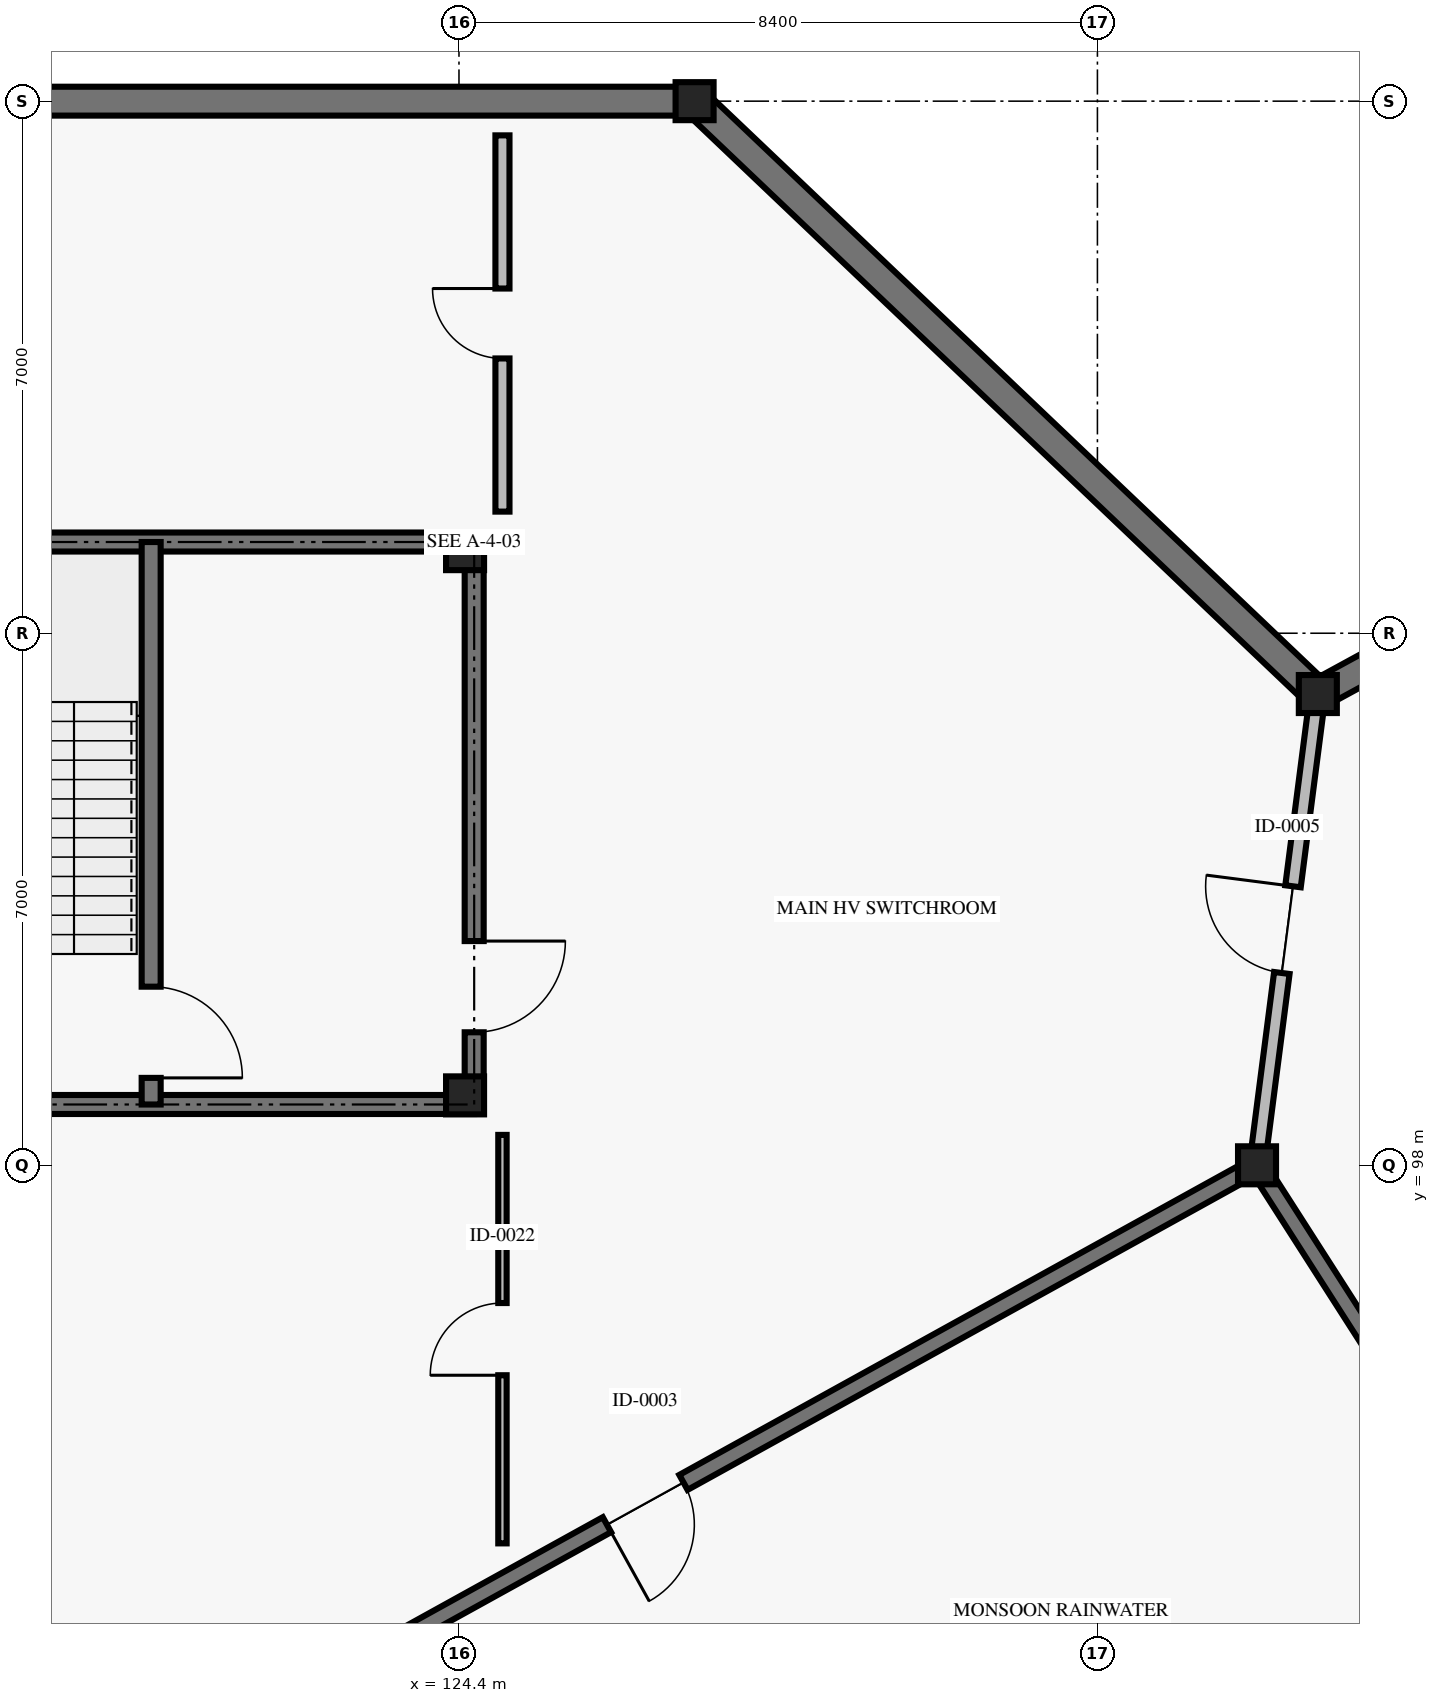
"""IFC4 building model, lengths in metres.
Left out: names, types, materials, properties, quantities, classifications, styles, units other than length and angle.
Written with IfcOpenShell. Run it as: python <this file> out.ifc"""

import sys

from ifc_helpers import new_model, si_unit, direction, frame, frame_2d, origin, origin_2d, place, context, subcontext, project, spatial, rectangle, i_section, extrude, element, fill, save


model = new_model("IFC4")
c1 = context("Model", 3, precision=1e-05, world=origin(), true_north=direction((0.0, 1.0)))
c2 = subcontext(c1, "Body", "Model", "MODEL_VIEW")
j1 = project(units=[si_unit("LENGTHUNIT", "METRE"), si_unit("PLANEANGLEUNIT", "RADIAN")], contexts=[c1])
p1 = place(None, origin())
s1 = spatial("IfcSite", under=j1, at=p1, CompositionType="ELEMENT")
p2 = place(p1, origin())
s2 = spatial("IfcBuilding", under=s1, at=p2, CompositionType="ELEMENT")
p3 = place(p2, frame((0.0, 0.0, -4.5)))
s3 = spatial("IfcBuildingStorey", under=s2, at=p3, CompositionType="ELEMENT", Elevation=-4.5)
for number, where, z_axis, x_axis in (
    (1, (127.5, 112.0, 0.0), (0.0, 0.0, 1.0), (1.0, 0.0, 0.0)),
    (2, (134.9, 98.0, 0.0), (0.0, 0.0, 1.0), (1.0, 0.0, 0.0)),
    (3, (135.7, 104.2, 0.0), (0.0, 0.0, 1.0), (1.0, 0.0, 0.0)),
    (4, (124.48, 98.92, 0.0), (0.0, 0.0, 1.0), (1.0, 0.0, 0.0)),
    (5, (124.48, 106.08, 0.0), (0.0, 0.0, 1.0), (1.0, 0.0, 0.0)),
):
    element("IfcColumn", number, at=place(p3, frame(where, z_axis=z_axis, x_axis=x_axis)), inside=s3, PredefinedType="COLUMN", context=c2, shape_type="SweptSolid", body=[
        extrude(i_section(OverallWidth=0.5, OverallDepth=0.5, WebThickness=0.022, FlangeThickness=0.036, at=origin_2d()), origin(), (0.0, 0.0, 1.0), 4.5),
    ])
p4 = place(p3, frame((135.664, 104.234, 0.0), z_axis=(0.0, 0.0, 1.0), x_axis=(-0.724544866469, 0.689227637631, 0.0)))
e6 = element("IfcWall", 6, at=p4, inside=s3, PredefinedType="USERDEFINED", context=c2, shape_type="SweptSolid", body=[
    extrude(rectangle(XDim=11.268, YDim=0.38, at=frame_2d((5.634, 0.0))), origin(), (0.0, 0.0, 1.0), 4.14),
])
p5 = place(p3, frame((127.5, 112.0, 0.0), z_axis=(0.0, 0.0, 1.0), x_axis=(-1.0, 0.0, 0.0)))
e7 = element("IfcWall", 7, at=p5, inside=s3, PredefinedType="USERDEFINED", context=c2, shape_type="SweptSolid", body=[
    extrude(rectangle(XDim=14.1, YDim=0.38, at=frame_2d((7.05, 0.0))), origin(), (0.0, 0.0, 1.0), 4.14),
])
p6 = place(p3, frame((150.0, 112.0, 0.0), z_axis=(0.0, 0.0, 1.0), x_axis=(-0.87790016936, -0.478843703768, 0.0)))
e8 = element("IfcWall", 8, at=p6, inside=s3, PredefinedType="USERDEFINED", context=c2, shape_type="SweptSolid", body=[
    extrude(rectangle(XDim=16.239, YDim=0.38, at=frame_2d((8.119, 0.0))), origin(), (0.0, 0.0, 1.0), 4.14),
])
p7 = place(p3, frame((134.9, 98.0, 0.0), z_axis=(0.0, 0.0, 1.0), x_axis=(-0.875181353329, -0.483794996652, 0.0)))
e9 = element("IfcWall", 9, at=p7, inside=s3, PredefinedType="SOLIDWALL", context=c2, shape_type="SweptSolid", body=[
    extrude(rectangle(XDim=18.396, YDim=0.225, at=frame_2d((9.198, 0.0))), origin(), (0.0, 0.0, 1.0), 4.14),
])
p8 = place(p7, frame((8.623, 0.0, 0.0)))
e10 = element("IfcOpeningElement", 10, at=p8, cuts=e9, PredefinedType="OPENING", context=c2, shape_type="SweptSolid", body=[
    extrude(rectangle(XDim=1.15, YDim=2.2, at=frame_2d((0.575, 1.1))), frame((0.0, 0.123, 0.0), z_axis=(0.0, -1.0, 0.0), x_axis=(1.0, 0.0, 0.0)), (0.0, 0.0, 1.0), 0.245),
])
p9 = place(p3, frame((143.1, 85.2, 0.0), z_axis=(0.0, 0.0, 1.0), x_axis=(-0.539434641352, 0.842027474439, 0.0)))
e11 = element("IfcWall", 11, at=p9, inside=s3, PredefinedType="SOLIDWALL", context=c2, shape_type="SweptSolid", body=[
    extrude(rectangle(XDim=15.201, YDim=0.225, at=frame_2d((7.601, 0.0))), origin(), (0.0, 0.0, 1.0), 4.14),
])
p10 = place(p9, frame((7.001, 0.0, 0.0)))
e12 = element("IfcOpeningElement", 12, at=p10, cuts=e11, PredefinedType="OPENING", context=c2, shape_type="SweptSolid", body=[
    extrude(rectangle(XDim=1.2, YDim=2.2, at=frame_2d((0.6, 1.1))), frame((0.0, 0.123, 0.0), z_axis=(0.0, -1.0, 0.0), x_axis=(1.0, 0.0, 0.0)), (0.0, 0.0, 1.0), 0.245),
])
p11 = place(p3, frame((134.9, 98.0, 0.0), z_axis=(0.0, 0.0, 1.0), x_axis=(0.127980011854, 0.991776747341, 0.0)))
e13 = element("IfcWall", 13, at=p11, inside=s3, PredefinedType="SOLIDWALL", context=c2, shape_type="SweptSolid", body=[
    extrude(rectangle(XDim=6.251, YDim=0.205, at=frame_2d((3.126, 0.0))), origin(), (0.0, 0.0, 1.0), 3.02),
])
p12 = place(p11, frame((2.551, 0.0, 0.0)))
e14 = element("IfcOpeningElement", 14, at=p12, cuts=e13, PredefinedType="OPENING", context=c2, shape_type="SweptSolid", body=[
    extrude(rectangle(XDim=1.15, YDim=2.2, at=frame_2d((0.575, 1.1))), frame((0.0, 0.113, 0.0), z_axis=(0.0, -1.0, 0.0), x_axis=(1.0, 0.0, 0.0)), (0.0, 0.0, 1.0), 0.225),
])
p13 = place(p3, frame((124.972, 93.026, 0.0), z_axis=(0.0, 0.0, 1.0), x_axis=(0.0, 1.0, 0.0)))
e15 = element("IfcWall", 15, at=p13, inside=s3, PredefinedType="PARTITIONING", context=c2, shape_type="SweptSolid", body=[
    extrude(rectangle(XDim=5.374, YDim=0.11, at=frame_2d((2.687, 0.0))), origin(), (0.0, 0.0, 1.0), 3.02),
])
p14 = place(p13, frame((2.212, 0.0, 0.0)))
e16 = element("IfcOpeningElement", 16, at=p14, cuts=e15, PredefinedType="OPENING", context=c2, shape_type="SweptSolid", body=[
    extrude(rectangle(XDim=0.95, YDim=2.15, at=frame_2d((0.475, 1.075))), frame((0.0, 0.065, 0.0), z_axis=(0.0, -1.0, 0.0), x_axis=(1.0, 0.0, 0.0)), (0.0, 0.0, 1.0), 0.13),
])
p15 = place(p3, frame((124.972, 106.6, 0.0), z_axis=(0.0, 0.0, 1.0), x_axis=(0.0, 1.0, 0.0)))
e17 = element("IfcWall", 17, at=p15, inside=s3, PredefinedType="PARTITIONING", context=c2, shape_type="SweptSolid", body=[
    extrude(rectangle(XDim=4.95, YDim=0.185, at=frame_2d((2.475, 0.0))), origin(), (0.0, 0.0, 1.0), 3.02),
])
p16 = place(p15, frame((2.015, 0.0, 0.0)))
e18 = element("IfcOpeningElement", 18, at=p16, cuts=e17, PredefinedType="OPENING", context=c2, shape_type="SweptSolid", body=[
    extrude(rectangle(XDim=0.92, YDim=2.1, at=frame_2d((0.46, 1.05))), frame((0.0, 0.103, 0.0), z_axis=(0.0, -1.0, 0.0), x_axis=(1.0, 0.0, 0.0)), (0.0, 0.0, 1.0), 0.205),
])
for number, where, z_axis, x_axis in (
    (19, (115.4, 106.2, 0.0), (0.0, 0.0, 1.0), (1.0, 0.0, 0.0)),
    (20, (124.6, 98.8, 0.0), (0.0, 0.0, 1.0), (-1.0, 0.0, 0.0)),
):
    element("IfcWall", number, at=place(p3, frame(where, z_axis=z_axis, x_axis=x_axis)), inside=s3, PredefinedType="SHEAR", context=c2, shape_type="SweptSolid", body=[
        extrude(rectangle(XDim=9.2, YDim=0.25, at=frame_2d((4.6, 0.0))), origin(), (0.0, 0.0, 1.0), 4.14),
    ])
p17 = place(p3, frame((124.6, 106.2, 0.0), z_axis=(0.0, 0.0, 1.0), x_axis=(0.0, -1.0, 0.0)))
e21 = element("IfcWall", 21, at=p17, inside=s3, PredefinedType="SHEAR", context=c2, shape_type="SweptSolid", body=[
    extrude(rectangle(XDim=7.4, YDim=0.25, at=frame_2d((3.7, 0.0))), origin(), (0.0, 0.0, 1.0), 4.14),
])
p18 = place(p17, frame((5.25, 0.0, 0.0)))
e22 = element("IfcOpeningElement", 22, at=p18, cuts=e21, PredefinedType="OPENING", context=c2, shape_type="SweptSolid", body=[
    extrude(rectangle(XDim=1.2, YDim=2.2, at=frame_2d((0.6, 1.1))), frame((0.0, 0.135, 0.0), z_axis=(0.0, -1.0, 0.0), x_axis=(1.0, 0.0, 0.0)), (0.0, 0.0, 1.0), 0.27),
])
p19 = place(p3, frame((120.35, 106.2, 0.0), z_axis=(0.0, 0.0, 1.0), x_axis=(0.0, -1.0, 0.0)))
e23 = element("IfcWall", 23, at=p19, inside=s3, PredefinedType="SHEAR", context=c2, shape_type="SweptSolid", body=[
    extrude(rectangle(XDim=7.4, YDim=0.25, at=frame_2d((3.7, 0.0))), origin(), (0.0, 0.0, 1.0), 4.14),
])
p20 = place(p19, frame((5.85, 0.0, 0.0)))
e24 = element("IfcOpeningElement", 24, at=p20, cuts=e23, PredefinedType="OPENING", context=c2, shape_type="SweptSolid", body=[
    extrude(rectangle(XDim=1.2, YDim=2.2, at=frame_2d((0.6, 1.1))), frame((0.0, 0.135, 0.0), z_axis=(0.0, -1.0, 0.0), x_axis=(1.0, 0.0, 0.0)), (0.0, 0.0, 1.0), 0.27),
])
p21 = place(p8, origin())
e25 = element("IfcDoor", 25, at=p21, inside=s3, OperationType="SINGLE_SWING_RIGHT", PredefinedType="DOOR", context=c2, shape_type="SweptSolid", body=[
    extrude(rectangle(XDim=1.15, YDim=2.2, at=frame_2d((0.575, 1.1))), frame((0.0, 0.025, 0.0), z_axis=(0.0, -1.0, 0.0), x_axis=(1.0, 0.0, 0.0)), (0.0, 0.0, 1.0), 0.05),
])
fill(e10, e25)
p22 = place(p12, origin())
e26 = element("IfcDoor", 26, at=p22, inside=s3, OperationType="SINGLE_SWING_RIGHT", PredefinedType="DOOR", context=c2, shape_type="SweptSolid", body=[
    extrude(rectangle(XDim=1.15, YDim=2.2, at=frame_2d((0.575, 1.1))), frame((0.0, 0.025, 0.0), z_axis=(0.0, -1.0, 0.0), x_axis=(1.0, 0.0, 0.0)), (0.0, 0.0, 1.0), 0.05),
])
fill(e14, e26)
p23 = place(p14, origin())
e27 = element("IfcDoor", 27, at=p23, inside=s3, OperationType="SINGLE_SWING_LEFT", PredefinedType="DOOR", context=c2, shape_type="SweptSolid", body=[
    extrude(rectangle(XDim=0.95, YDim=2.15, at=frame_2d((0.475, 1.075))), frame((0.0, 0.025, 0.0), z_axis=(0.0, -1.0, 0.0), x_axis=(1.0, 0.0, 0.0)), (0.0, 0.0, 1.0), 0.05),
])
fill(e16, e27)
p24 = place(p16, origin())
e28 = element("IfcDoor", 28, at=p24, inside=s3, OperationType="SINGLE_SWING_RIGHT", PredefinedType="DOOR", context=c2, shape_type="SweptSolid", body=[
    extrude(rectangle(XDim=0.92, YDim=2.1, at=frame_2d((0.46, 1.05))), frame((0.0, 0.025, 0.0), z_axis=(0.0, -1.0, 0.0), x_axis=(1.0, 0.0, 0.0)), (0.0, 0.0, 1.0), 0.05),
])
fill(e18, e28)
p25 = place(p18, origin())
e29 = element("IfcDoor", 29, at=p25, inside=s3, OperationType="SINGLE_SWING_LEFT", PredefinedType="DOOR", context=c2, shape_type="SweptSolid", body=[
    extrude(rectangle(XDim=1.2, YDim=2.2, at=frame_2d((0.6, 1.1))), frame((0.0, 0.025, 0.0), z_axis=(0.0, -1.0, 0.0), x_axis=(1.0, 0.0, 0.0)), (0.0, 0.0, 1.0), 0.05),
])
fill(e22, e29)
p26 = place(p20, origin())
e30 = element("IfcDoor", 30, at=p26, inside=s3, OperationType="SINGLE_SWING_RIGHT", PredefinedType="DOOR", context=c2, shape_type="SweptSolid", body=[
    extrude(rectangle(XDim=1.2, YDim=2.2, at=frame_2d((0.6, 1.1))), frame((0.0, 0.025, 0.0), z_axis=(0.0, -1.0, 0.0), x_axis=(1.0, 0.0, 0.0)), (0.0, 0.0, 1.0), 0.05),
])
fill(e24, e30)
save(model, sys.argv[1])
